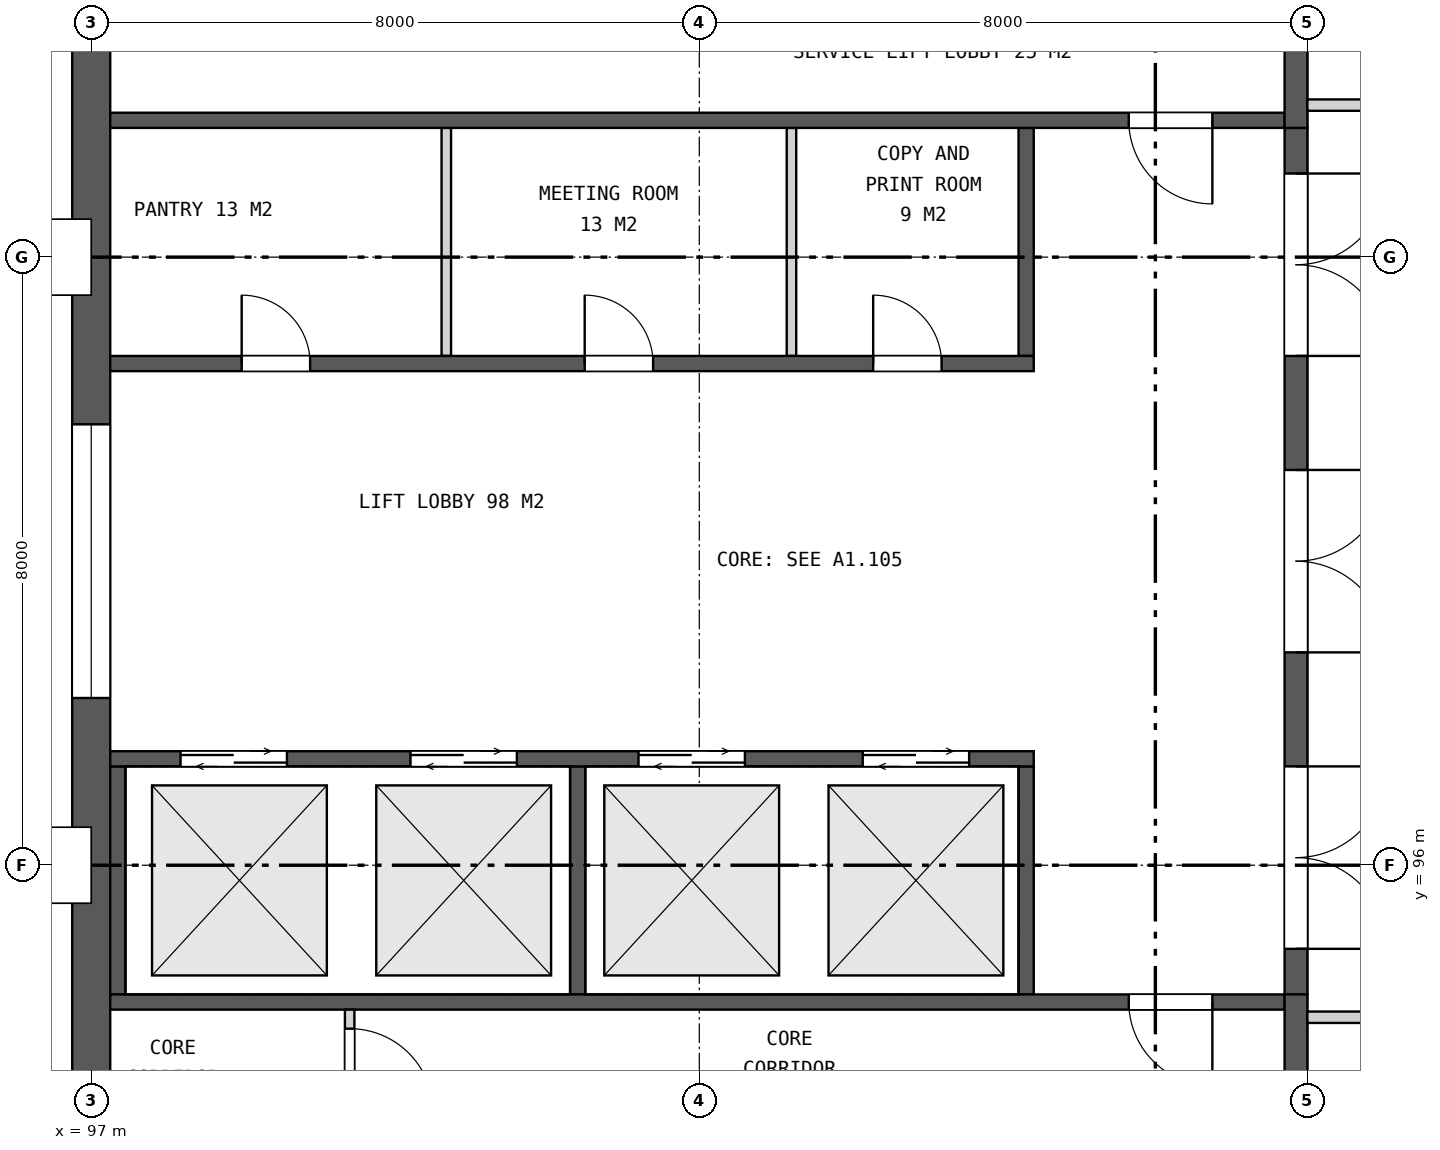
"""IFC4 building model, lengths in metres.
Left out: names, types, materials, properties, quantities, classifications, styles, units other than length and angle.
Written with IfcOpenShell. Run it as: python <this file> out.ifc"""

import sys

from ifc_helpers import new_model, si_unit, direction, frame, frame_2d, origin, place, context, subcontext, project, spatial, rectangle, extrude, element, fill, save


model = new_model("IFC4")
c1 = context("Model", 3, precision=1e-05, world=origin(), true_north=direction((0.0, 1.0)))
c2 = subcontext(c1, "Body", "Model", "MODEL_VIEW")
j1 = project(units=[si_unit("LENGTHUNIT", "METRE"), si_unit("PLANEANGLEUNIT", "RADIAN")], contexts=[c1])
p1 = place(None, origin())
s1 = spatial("IfcSite", under=j1, at=p1, CompositionType="ELEMENT")
p2 = place(p1, origin())
s2 = spatial("IfcBuilding", under=s1, at=p2, CompositionType="ELEMENT")
p3 = place(p2, frame((0.0, 0.0, 295.5)))
s3 = spatial("IfcBuildingStorey", under=s2, at=p3, CompositionType="ELEMENT", Elevation=295.5)
p4 = place(p3, frame((97.0, 111.75, 0.0), z_axis=(0.0, 0.0, 1.0), x_axis=(0.0, -1.0, 0.0)))
e1 = element("IfcWall", 1, at=p4, inside=s3, PredefinedType="SHEAR", context=c2, shape_type="SweptSolid", body=[
    extrude(rectangle(XDim=23.5, YDim=0.5, at=frame_2d((11.75, 0.0))), origin(), (0.0, 0.0, 1.0), 4.2),
])
p5 = place(p4, frame((9.95, 0.0, 0.15)))
e2 = element("IfcOpeningElement", 2, at=p5, cuts=e1, PredefinedType="OPENING", context=c2, shape_type="SweptSolid", body=[
    extrude(rectangle(XDim=3.6, YDim=3.0, at=frame_2d((1.8, 1.5))), frame((0.0, 0.26, 0.0), z_axis=(0.0, -1.0, 0.0), x_axis=(1.0, 0.0, 0.0)), (0.0, 0.0, 1.0), 0.52),
])
p6 = place(p3, frame((112.85, 105.7, 0.0), z_axis=(0.0, 0.0, 1.0), x_axis=(0.0, -1.0, 0.0)))
e3 = element("IfcWall", 3, at=p6, inside=s3, PredefinedType="SHEAR", context=c2, shape_type="SweptSolid", body=[
    extrude(rectangle(XDim=11.4, YDim=0.3, at=frame_2d((5.7, 0.0))), origin(), (0.0, 0.0, 1.0), 4.2),
])
p7 = place(p6, frame((0.6, 0.0, 0.0)))
e4 = element("IfcOpeningElement", 4, at=p7, cuts=e3, PredefinedType="OPENING", context=c2, shape_type="SweptSolid", body=[
    extrude(rectangle(XDim=2.4, YDim=2.4, at=frame_2d((1.2, 1.2))), frame((0.0, 0.16, 0.0), z_axis=(0.0, -1.0, 0.0), x_axis=(1.0, 0.0, 0.0)), (0.0, 0.0, 1.0), 0.32),
])
p8 = place(p6, frame((4.5, 0.0, 0.0)))
e5 = element("IfcOpeningElement", 5, at=p8, cuts=e3, PredefinedType="OPENING", context=c2, shape_type="SweptSolid", body=[
    extrude(rectangle(XDim=2.4, YDim=2.4, at=frame_2d((1.2, 1.2))), frame((0.0, 0.16, 0.0), z_axis=(0.0, -1.0, 0.0), x_axis=(1.0, 0.0, 0.0)), (0.0, 0.0, 1.0), 0.32),
])
p9 = place(p6, frame((8.4, 0.0, 0.0)))
e6 = element("IfcOpeningElement", 6, at=p9, cuts=e3, PredefinedType="OPENING", context=c2, shape_type="SweptSolid", body=[
    extrude(rectangle(XDim=2.4, YDim=2.4, at=frame_2d((1.2, 1.2))), frame((0.0, 0.16, 0.0), z_axis=(0.0, -1.0, 0.0), x_axis=(1.0, 0.0, 0.0)), (0.0, 0.0, 1.0), 0.32),
])
for number, where, z_axis, x_axis in (
    (7, (109.3, 97.3, 0.0), (0.0, 0.0, 1.0), (0.0, -1.0, 0.0)),
    (8, (103.4, 97.3, 0.0), (0.0, 0.0, 1.0), (0.0, -1.0, 0.0)),
    (9, (97.35, 97.3, 0.0), (0.0, 0.0, 1.0), (0.0, -1.0, 0.0)),
):
    element("IfcWall", number, at=place(p3, frame(where, z_axis=z_axis, x_axis=x_axis)), inside=s3, PredefinedType="SHEAR", context=c2, shape_type="SweptSolid", body=[
        extrude(rectangle(XDim=3.0, YDim=0.2, at=frame_2d((1.5, 0.0))), origin(), (0.0, 0.0, 1.0), 4.2),
    ])
p10 = place(p3, frame((109.4, 97.4, 0.0), z_axis=(0.0, 0.0, 1.0), x_axis=(-1.0, 0.0, 0.0)))
e10 = element("IfcWall", 10, at=p10, inside=s3, PredefinedType="SHEAR", context=c2, shape_type="SweptSolid", body=[
    extrude(rectangle(XDim=12.15, YDim=0.2, at=frame_2d((6.075, 0.0))), origin(), (0.0, 0.0, 1.0), 4.2),
])
p11 = place(p10, frame((0.85, 0.0, 0.0)))
e11 = element("IfcOpeningElement", 11, at=p11, cuts=e10, PredefinedType="OPENING", context=c2, shape_type="SweptSolid", body=[
    extrude(rectangle(XDim=1.4, YDim=2.1, at=frame_2d((0.7, 1.05))), frame((0.0, 0.11, 0.0), z_axis=(0.0, -1.0, 0.0), x_axis=(1.0, 0.0, 0.0)), (0.0, 0.0, 1.0), 0.22),
])
p12 = place(p10, frame((3.8, 0.0, 0.0)))
e12 = element("IfcOpeningElement", 12, at=p12, cuts=e10, PredefinedType="OPENING", context=c2, shape_type="SweptSolid", body=[
    extrude(rectangle(XDim=1.4, YDim=2.1, at=frame_2d((0.7, 1.05))), frame((0.0, 0.11, 0.0), z_axis=(0.0, -1.0, 0.0), x_axis=(1.0, 0.0, 0.0)), (0.0, 0.0, 1.0), 0.22),
])
p13 = place(p10, frame((6.8, 0.0, 0.0)))
e13 = element("IfcOpeningElement", 13, at=p13, cuts=e10, PredefinedType="OPENING", context=c2, shape_type="SweptSolid", body=[
    extrude(rectangle(XDim=1.4, YDim=2.1, at=frame_2d((0.7, 1.05))), frame((0.0, 0.11, 0.0), z_axis=(0.0, -1.0, 0.0), x_axis=(1.0, 0.0, 0.0)), (0.0, 0.0, 1.0), 0.22),
])
p14 = place(p10, frame((9.825, 0.0, 0.0)))
e14 = element("IfcOpeningElement", 14, at=p14, cuts=e10, PredefinedType="OPENING", context=c2, shape_type="SweptSolid", body=[
    extrude(rectangle(XDim=1.4, YDim=2.1, at=frame_2d((0.7, 1.05))), frame((0.0, 0.11, 0.0), z_axis=(0.0, -1.0, 0.0), x_axis=(1.0, 0.0, 0.0)), (0.0, 0.0, 1.0), 0.22),
])
p15 = place(p3, frame((109.3, 105.7, 0.0), z_axis=(0.0, 0.0, 1.0), x_axis=(0.0, -1.0, 0.0)))
e15 = element("IfcWall", 15, at=p15, inside=s3, PredefinedType="SHEAR", context=c2, shape_type="SweptSolid", body=[
    extrude(rectangle(XDim=3.0, YDim=0.2, at=frame_2d((1.5, 0.0))), origin(), (0.0, 0.0, 1.0), 4.2),
])
for number, where, z_axis, x_axis in (
    (16, (106.212, 105.7, 0.0), (0.0, 0.0, 1.0), (0.0, -1.0, 0.0)),
    (17, (101.671, 105.7, 0.0), (0.0, 0.0, 1.0), (0.0, -1.0, 0.0)),
):
    element("IfcWall", number, at=place(p3, frame(where, z_axis=z_axis, x_axis=x_axis)), inside=s3, PredefinedType="PARTITIONING", context=c2, shape_type="SweptSolid", body=[
        extrude(rectangle(XDim=3.0, YDim=0.125, at=frame_2d((1.5, 0.0))), origin(), (0.0, 0.0, 1.0), 4.2),
    ])
p16 = place(p3, frame((109.4, 102.6, 0.0), z_axis=(0.0, 0.0, 1.0), x_axis=(-1.0, 0.0, 0.0)))
e18 = element("IfcWall", 18, at=p16, inside=s3, PredefinedType="SHEAR", context=c2, shape_type="SweptSolid", body=[
    extrude(rectangle(XDim=12.15, YDim=0.2, at=frame_2d((6.075, 0.0))), origin(), (0.0, 0.0, 1.0), 4.2),
])
p17 = place(p16, frame((1.212, 0.0, 0.0)))
e19 = element("IfcOpeningElement", 19, at=p17, cuts=e18, PredefinedType="OPENING", context=c2, shape_type="SweptSolid", body=[
    extrude(rectangle(XDim=0.9, YDim=2.1, at=frame_2d((0.45, 1.05))), frame((0.0, 0.11, 0.0), z_axis=(0.0, -1.0, 0.0), x_axis=(1.0, 0.0, 0.0)), (0.0, 0.0, 1.0), 0.22),
])
p18 = place(p16, frame((5.008, 0.0, 0.0)))
e20 = element("IfcOpeningElement", 20, at=p18, cuts=e18, PredefinedType="OPENING", context=c2, shape_type="SweptSolid", body=[
    extrude(rectangle(XDim=0.9, YDim=2.1, at=frame_2d((0.45, 1.05))), frame((0.0, 0.11, 0.0), z_axis=(0.0, -1.0, 0.0), x_axis=(1.0, 0.0, 0.0)), (0.0, 0.0, 1.0), 0.22),
])
p19 = place(p16, frame((9.521, 0.0, 0.0)))
e21 = element("IfcOpeningElement", 21, at=p19, cuts=e18, PredefinedType="OPENING", context=c2, shape_type="SweptSolid", body=[
    extrude(rectangle(XDim=0.9, YDim=2.1, at=frame_2d((0.45, 1.05))), frame((0.0, 0.11, 0.0), z_axis=(0.0, -1.0, 0.0), x_axis=(1.0, 0.0, 0.0)), (0.0, 0.0, 1.0), 0.22),
])
p20 = place(p3, frame((112.7, 94.2, 0.0), z_axis=(0.0, 0.0, 1.0), x_axis=(-1.0, 0.0, 0.0)))
e22 = element("IfcWall", 22, at=p20, inside=s3, PredefinedType="SHEAR", context=c2, shape_type="SweptSolid", body=[
    extrude(rectangle(XDim=15.45, YDim=0.2, at=frame_2d((7.725, 0.0))), origin(), (0.0, 0.0, 1.0), 4.2),
])
p21 = place(p20, frame((0.95, 0.0, 0.0)))
e23 = element("IfcOpeningElement", 23, at=p21, cuts=e22, PredefinedType="OPENING", context=c2, shape_type="SweptSolid", body=[
    extrude(rectangle(XDim=1.1, YDim=2.1, at=frame_2d((0.55, 1.05))), frame((0.0, 0.11, 0.0), z_axis=(0.0, -1.0, 0.0), x_axis=(1.0, 0.0, 0.0)), (0.0, 0.0, 1.0), 0.22),
])
p22 = place(p3, frame((112.85, 94.3, 0.0), z_axis=(0.0, 0.0, 1.0), x_axis=(0.0, -1.0, 0.0)))
e24 = element("IfcWall", 24, at=p22, inside=s3, PredefinedType="SHEAR", context=c2, shape_type="SweptSolid", body=[
    extrude(rectangle(XDim=6.05, YDim=0.3, at=frame_2d((3.025, 0.0))), origin(), (0.0, 0.0, 1.0), 4.2),
])
p23 = place(p3, frame((100.4, 94.1, 0.0), z_axis=(0.0, 0.0, 1.0), x_axis=(0.0, -1.0, 0.0)))
e25 = element("IfcWall", 25, at=p23, inside=s3, PredefinedType="PARTITIONING", context=c2, shape_type="SweptSolid", body=[
    extrude(rectangle(XDim=1.6, YDim=0.125, at=frame_2d((0.8, 0.0))), origin(), (0.0, 0.0, 1.0), 4.2),
])
p24 = place(p23, frame((0.25, 0.0, 0.0)))
e26 = element("IfcOpeningElement", 26, at=p24, cuts=e25, PredefinedType="OPENING", context=c2, shape_type="SweptSolid", body=[
    extrude(rectangle(XDim=1.1, YDim=2.1, at=frame_2d((0.55, 1.05))), frame((0.0, 0.073, 0.0), z_axis=(0.0, -1.0, 0.0), x_axis=(1.0, 0.0, 0.0)), (0.0, 0.0, 1.0), 0.145),
])
p25 = place(p3, frame((112.7, 105.8, 0.0), z_axis=(0.0, 0.0, 1.0), x_axis=(-1.0, 0.0, 0.0)))
e27 = element("IfcWall", 27, at=p25, inside=s3, PredefinedType="SHEAR", context=c2, shape_type="SweptSolid", body=[
    extrude(rectangle(XDim=15.45, YDim=0.2, at=frame_2d((7.725, 0.0))), origin(), (0.0, 0.0, 1.0), 4.2),
])
p26 = place(p25, frame((0.95, 0.0, 0.0)))
e28 = element("IfcOpeningElement", 28, at=p26, cuts=e27, PredefinedType="OPENING", context=c2, shape_type="SweptSolid", body=[
    extrude(rectangle(XDim=1.1, YDim=2.1, at=frame_2d((0.55, 1.05))), frame((0.0, 0.11, 0.0), z_axis=(0.0, -1.0, 0.0), x_axis=(1.0, 0.0, 0.0)), (0.0, 0.0, 1.0), 0.22),
])
p27 = place(p3, frame((112.85, 111.75, 0.0), z_axis=(0.0, 0.0, 1.0), x_axis=(0.0, -1.0, 0.0)))
e29 = element("IfcWall", 29, at=p27, inside=s3, PredefinedType="SHEAR", context=c2, shape_type="SweptSolid", body=[
    extrude(rectangle(XDim=6.05, YDim=0.3, at=frame_2d((3.025, 0.0))), origin(), (0.0, 0.0, 1.0), 4.2),
])
for number, where, z_axis, x_axis in (
    (30, (113.0, 94.0, 0.0), (0.0, 0.0, 1.0), (1.0, 0.0, 0.0)),
    (31, (113.0, 106.0, 0.0), (0.0, 0.0, 1.0), (1.0, 0.0, 0.0)),
):
    element("IfcWall", number, at=place(p3, frame(where, z_axis=z_axis, x_axis=x_axis)), inside=s3, PredefinedType="PARTITIONING", context=c2, shape_type="SweptSolid", body=[
        extrude(rectangle(XDim=5.525, YDim=0.15, at=frame_2d((2.762, 0.0))), origin(), (0.0, 0.0, 1.0), 3.443),
    ])
p28 = place(p5, origin())
e32 = element("IfcWindow", 32, at=p28, inside=s3, PartitioningType="SINGLE_PANEL", PredefinedType="WINDOW", context=c2, shape_type="SweptSolid", body=[
    extrude(rectangle(XDim=3.6, YDim=3.0, at=frame_2d((1.8, 1.5))), frame((0.0, 0.03, 0.0), z_axis=(0.0, -1.0, 0.0), x_axis=(1.0, 0.0, 0.0)), (0.0, 0.0, 1.0), 0.06),
])
fill(e2, e32)
p29 = place(p7, origin())
e33 = element("IfcDoor", 33, at=p29, inside=s3, OperationType="DOUBLE_DOOR_SINGLE_SWING", PredefinedType="DOOR", context=c2, shape_type="SweptSolid", body=[
    extrude(rectangle(XDim=2.4, YDim=2.4, at=frame_2d((1.2, 1.2))), frame((0.0, 0.025, 0.0), z_axis=(0.0, -1.0, 0.0), x_axis=(1.0, 0.0, 0.0)), (0.0, 0.0, 1.0), 0.05),
])
fill(e4, e33)
p30 = place(p8, origin())
e34 = element("IfcDoor", 34, at=p30, inside=s3, OperationType="DOUBLE_DOOR_SINGLE_SWING", PredefinedType="DOOR", context=c2, shape_type="SweptSolid", body=[
    extrude(rectangle(XDim=2.4, YDim=2.4, at=frame_2d((1.2, 1.2))), frame((0.0, 0.025, 0.0), z_axis=(0.0, -1.0, 0.0), x_axis=(1.0, 0.0, 0.0)), (0.0, 0.0, 1.0), 0.05),
])
fill(e5, e34)
p31 = place(p9, origin())
e35 = element("IfcDoor", 35, at=p31, inside=s3, OperationType="DOUBLE_DOOR_SINGLE_SWING", PredefinedType="DOOR", context=c2, shape_type="SweptSolid", body=[
    extrude(rectangle(XDim=2.4, YDim=2.4, at=frame_2d((1.2, 1.2))), frame((0.0, 0.025, 0.0), z_axis=(0.0, -1.0, 0.0), x_axis=(1.0, 0.0, 0.0)), (0.0, 0.0, 1.0), 0.05),
])
fill(e6, e35)
p32 = place(p11, origin())
e36 = element("IfcDoor", 36, at=p32, inside=s3, OperationType="DOUBLE_DOOR_SLIDING", PredefinedType="DOOR", context=c2, shape_type="SweptSolid", body=[
    extrude(rectangle(XDim=1.4, YDim=2.1, at=frame_2d((0.7, 1.05))), frame((0.0, 0.025, 0.0), z_axis=(0.0, -1.0, 0.0), x_axis=(1.0, 0.0, 0.0)), (0.0, 0.0, 1.0), 0.05),
])
fill(e11, e36)
p33 = place(p12, origin())
e37 = element("IfcDoor", 37, at=p33, inside=s3, OperationType="DOUBLE_DOOR_SLIDING", PredefinedType="DOOR", context=c2, shape_type="SweptSolid", body=[
    extrude(rectangle(XDim=1.4, YDim=2.1, at=frame_2d((0.7, 1.05))), frame((0.0, 0.025, 0.0), z_axis=(0.0, -1.0, 0.0), x_axis=(1.0, 0.0, 0.0)), (0.0, 0.0, 1.0), 0.05),
])
fill(e12, e37)
p34 = place(p13, origin())
e38 = element("IfcDoor", 38, at=p34, inside=s3, OperationType="DOUBLE_DOOR_SLIDING", PredefinedType="DOOR", context=c2, shape_type="SweptSolid", body=[
    extrude(rectangle(XDim=1.4, YDim=2.1, at=frame_2d((0.7, 1.05))), frame((0.0, 0.025, 0.0), z_axis=(0.0, -1.0, 0.0), x_axis=(1.0, 0.0, 0.0)), (0.0, 0.0, 1.0), 0.05),
])
fill(e13, e38)
p35 = place(p14, origin())
e39 = element("IfcDoor", 39, at=p35, inside=s3, OperationType="DOUBLE_DOOR_SLIDING", PredefinedType="DOOR", context=c2, shape_type="SweptSolid", body=[
    extrude(rectangle(XDim=1.4, YDim=2.1, at=frame_2d((0.7, 1.05))), frame((0.0, 0.025, 0.0), z_axis=(0.0, -1.0, 0.0), x_axis=(1.0, 0.0, 0.0)), (0.0, 0.0, 1.0), 0.05),
])
fill(e14, e39)
p36 = place(p17, frame((0.9, 0.0, 0.0), z_axis=(0.0, 0.0, 1.0), x_axis=(-1.0, 0.0, 0.0)))
e40 = element("IfcDoor", 40, at=p36, inside=s3, OperationType="SINGLE_SWING_LEFT", PredefinedType="DOOR", context=c2, shape_type="SweptSolid", body=[
    extrude(rectangle(XDim=0.9, YDim=2.1, at=frame_2d((0.45, 1.05))), frame((0.0, 0.025, 0.0), z_axis=(0.0, -1.0, 0.0), x_axis=(1.0, 0.0, 0.0)), (0.0, 0.0, 1.0), 0.05),
])
fill(e19, e40)
p37 = place(p18, frame((0.9, 0.0, 0.0), z_axis=(0.0, 0.0, 1.0), x_axis=(-1.0, 0.0, 0.0)))
e41 = element("IfcDoor", 41, at=p37, inside=s3, OperationType="SINGLE_SWING_LEFT", PredefinedType="DOOR", context=c2, shape_type="SweptSolid", body=[
    extrude(rectangle(XDim=0.9, YDim=2.1, at=frame_2d((0.45, 1.05))), frame((0.0, 0.025, 0.0), z_axis=(0.0, -1.0, 0.0), x_axis=(1.0, 0.0, 0.0)), (0.0, 0.0, 1.0), 0.05),
])
fill(e20, e41)
p38 = place(p19, frame((0.9, 0.0, 0.0), z_axis=(0.0, 0.0, 1.0), x_axis=(-1.0, 0.0, 0.0)))
e42 = element("IfcDoor", 42, at=p38, inside=s3, OperationType="SINGLE_SWING_LEFT", PredefinedType="DOOR", context=c2, shape_type="SweptSolid", body=[
    extrude(rectangle(XDim=0.9, YDim=2.1, at=frame_2d((0.45, 1.05))), frame((0.0, 0.025, 0.0), z_axis=(0.0, -1.0, 0.0), x_axis=(1.0, 0.0, 0.0)), (0.0, 0.0, 1.0), 0.05),
])
fill(e21, e42)
p39 = place(p21, origin())
e43 = element("IfcDoor", 43, at=p39, inside=s3, OperationType="SINGLE_SWING_LEFT", PredefinedType="DOOR", context=c2, shape_type="SweptSolid", body=[
    extrude(rectangle(XDim=1.1, YDim=2.1, at=frame_2d((0.55, 1.05))), frame((0.0, 0.025, 0.0), z_axis=(0.0, -1.0, 0.0), x_axis=(1.0, 0.0, 0.0)), (0.0, 0.0, 1.0), 0.05),
])
fill(e23, e43)
p40 = place(p24, origin())
e44 = element("IfcDoor", 44, at=p40, inside=s3, OperationType="SINGLE_SWING_RIGHT", PredefinedType="DOOR", context=c2, shape_type="SweptSolid", body=[
    extrude(rectangle(XDim=1.1, YDim=2.1, at=frame_2d((0.55, 1.05))), frame((0.0, 0.025, 0.0), z_axis=(0.0, -1.0, 0.0), x_axis=(1.0, 0.0, 0.0)), (0.0, 0.0, 1.0), 0.05),
])
fill(e26, e44)
p41 = place(p26, origin())
e45 = element("IfcDoor", 45, at=p41, inside=s3, OperationType="SINGLE_SWING_LEFT", PredefinedType="DOOR", context=c2, shape_type="SweptSolid", body=[
    extrude(rectangle(XDim=1.1, YDim=2.1, at=frame_2d((0.55, 1.05))), frame((0.0, 0.025, 0.0), z_axis=(0.0, -1.0, 0.0), x_axis=(1.0, 0.0, 0.0)), (0.0, 0.0, 1.0), 0.05),
])
fill(e28, e45)
save(model, sys.argv[1])
